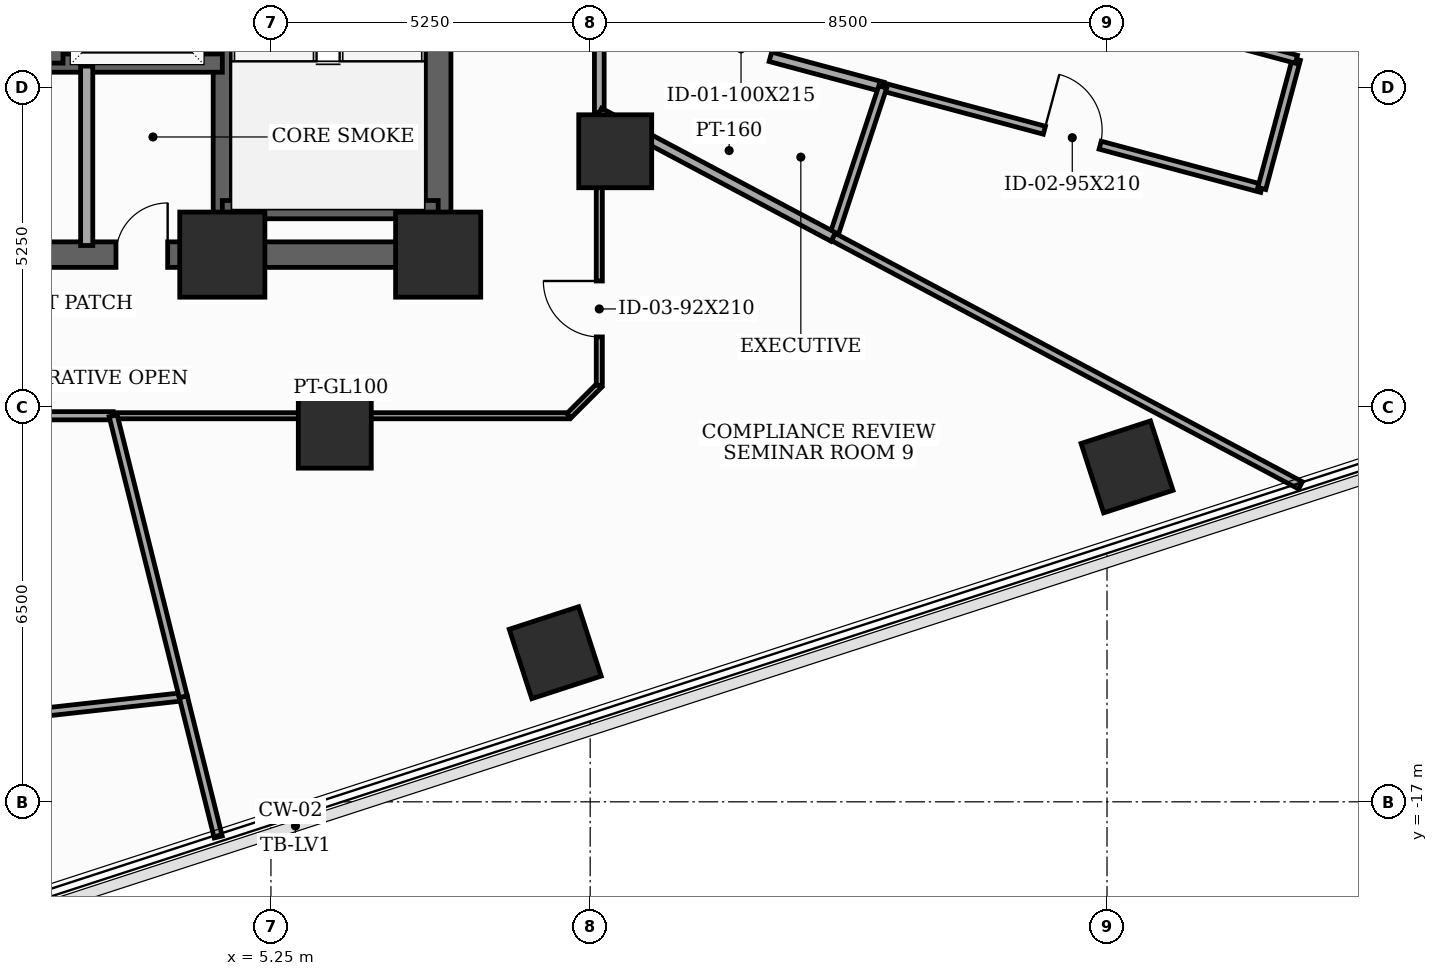
"""IFC4 building model, lengths in metres.
Left out: names, types, materials, properties, quantities, classifications, styles, units other than length and angle.
Written with IfcOpenShell. Run it as: python <this file> out.ifc"""

import sys

from ifc_helpers import new_model, si_unit, direction, frame, frame_2d, origin, origin_2d, place, context, subcontext, project, spatial, rectangle, extrude, element, fill, save


model = new_model("IFC4")
c1 = context("Model", 3, precision=1e-05, world=origin(), true_north=direction((0.0, 1.0)))
c2 = subcontext(c1, "Body", "Model", "MODEL_VIEW")
j1 = project(units=[si_unit("LENGTHUNIT", "METRE"), si_unit("PLANEANGLEUNIT", "RADIAN")], contexts=[c1])
p1 = place(None, origin())
s1 = spatial("IfcSite", under=j1, at=p1, CompositionType="ELEMENT")
p2 = place(p1, origin())
s2 = spatial("IfcBuilding", under=s1, at=p2, CompositionType="ELEMENT")
p3 = place(p2, frame((0.0, 0.0, 112.5)))
s3 = spatial("IfcBuildingStorey", under=s2, at=p3, CompositionType="ELEMENT", Elevation=112.5)
for number, where, z_axis, x_axis in (
    (1, (4.45, -8.0, 0.0), (0.0, 0.0, 1.0), (1.0, 0.0, 0.0)),
    (2, (8.0, -8.0, 0.0), (0.0, 0.0, 1.0), (1.0, 0.0, 0.0)),
):
    element("IfcColumn", number, at=place(p3, frame(where, z_axis=z_axis, x_axis=x_axis)), inside=s3, PredefinedType="COLUMN", context=c2, shape_type="SweptSolid", body=[
        extrude(rectangle(XDim=1.4, YDim=1.4, at=origin_2d()), origin(), (0.0, 0.0, 1.0), 3.7),
    ])
for number, where, z_axis, x_axis in (
    (3, (6.3, -10.912, 0.0), (0.0, 0.0, 1.0), (1.0, 0.0, 0.0)),
    (4, (10.912, -6.3, 0.0), (0.0, 0.0, 1.0), (1.0, 0.0, 0.0)),
    (5, (9.925, -14.547, 0.0), (0.0, 0.0, 1.0), (0.951, 0.309, 0.0)),
    (6, (19.329, -11.491, 0.0), (0.0, 0.0, 1.0), (0.951, 0.309, 0.0)),
):
    element("IfcColumn", number, at=place(p3, frame(where, z_axis=z_axis, x_axis=x_axis)), inside=s3, PredefinedType="COLUMN", context=c2, shape_type="SweptSolid", body=[
        extrude(rectangle(XDim=1.2, YDim=1.2, at=origin_2d()), origin(), (0.0, 0.0, 1.0), 3.7),
    ])
p4 = place(p3, frame((8.0, -8.0, 0.0), z_axis=(0.0, 0.0, 1.0), x_axis=(0.0, 1.0, 0.0)))
e7 = element("IfcWall", 7, at=p4, inside=s3, PredefinedType="SHEAR", context=c2, shape_type="SweptSolid", body=[
    extrude(rectangle(XDim=16.0, YDim=0.42, at=frame_2d((8.0, 0.0))), origin(), (0.0, 0.0, 1.0), 3.5),
])
p5 = place(p4, frame((9.6, 0.0, 0.0)))
e8 = element("IfcOpeningElement", 8, at=p5, cuts=e7, PredefinedType="OPENING", context=c2, shape_type="SweptSolid", body=[
    extrude(rectangle(XDim=1.05, YDim=2.15, at=frame_2d((0.525, 1.075))), frame((0.0, 0.22, 0.0), z_axis=(0.0, -1.0, 0.0), x_axis=(1.0, 0.0, 0.0)), (0.0, 0.0, 1.0), 0.44),
])
p6 = place(p4, frame((14.229, 0.0, 0.0)))
e9 = element("IfcOpeningElement", 9, at=p6, cuts=e7, PredefinedType="OPENING", context=c2, shape_type="SweptSolid", body=[
    extrude(rectangle(XDim=0.85, YDim=2.02, at=frame_2d((0.425, 1.01))), frame((0.0, 0.22, 0.0), z_axis=(0.0, -1.0, 0.0), x_axis=(1.0, 0.0, 0.0)), (0.0, 0.0, 1.0), 0.44),
])
p7 = place(p3, frame((-8.0, -8.0, 0.0), z_axis=(0.0, 0.0, 1.0), x_axis=(1.0, 0.0, 0.0)))
e10 = element("IfcWall", 10, at=p7, inside=s3, PredefinedType="SHEAR", context=c2, shape_type="SweptSolid", body=[
    extrude(rectangle(XDim=16.0, YDim=0.42, at=frame_2d((8.0, 0.0))), origin(), (0.0, 0.0, 1.0), 3.5),
])
p8 = place(p7, frame((4.449, 0.0, 0.0)))
e11 = element("IfcOpeningElement", 11, at=p8, cuts=e10, PredefinedType="OPENING", context=c2, shape_type="SweptSolid", body=[
    extrude(rectangle(XDim=0.85, YDim=2.02, at=frame_2d((0.425, 1.01))), frame((0.0, 0.22, 0.0), z_axis=(0.0, -1.0, 0.0), x_axis=(1.0, 0.0, 0.0)), (0.0, 0.0, 1.0), 0.44),
])
p9 = place(p7, frame((6.49, 0.0, 0.0)))
e12 = element("IfcOpeningElement", 12, at=p9, cuts=e10, PredefinedType="OPENING", context=c2, shape_type="SweptSolid", body=[
    extrude(rectangle(XDim=0.85, YDim=2.02, at=frame_2d((0.425, 1.01))), frame((0.0, 0.22, 0.0), z_axis=(0.0, -1.0, 0.0), x_axis=(1.0, 0.0, 0.0)), (0.0, 0.0, 1.0), 0.44),
])
p10 = place(p7, frame((8.69, 0.0, 0.0)))
e13 = element("IfcOpeningElement", 13, at=p10, cuts=e10, PredefinedType="OPENING", context=c2, shape_type="SweptSolid", body=[
    extrude(rectangle(XDim=0.85, YDim=2.02, at=frame_2d((0.425, 1.01))), frame((0.0, 0.22, 0.0), z_axis=(0.0, -1.0, 0.0), x_axis=(1.0, 0.0, 0.0)), (0.0, 0.0, 1.0), 0.44),
])
p11 = place(p7, frame((10.701, 0.0, 0.0)))
e14 = element("IfcOpeningElement", 14, at=p11, cuts=e10, PredefinedType="OPENING", context=c2, shape_type="SweptSolid", body=[
    extrude(rectangle(XDim=0.85, YDim=2.02, at=frame_2d((0.425, 1.01))), frame((0.0, 0.22, 0.0), z_axis=(0.0, -1.0, 0.0), x_axis=(1.0, 0.0, 0.0)), (0.0, 0.0, 1.0), 0.44),
])
p12 = place(p3, frame((4.45, -7.79, 0.0), z_axis=(0.0, 0.0, 1.0), x_axis=(0.0, 1.0, 0.0)))
e15 = element("IfcWall", 15, at=p12, inside=s3, PredefinedType="SHEAR", context=c2, shape_type="SweptSolid", body=[
    extrude(rectangle(XDim=15.58, YDim=0.3, at=frame_2d((7.79, 0.0))), origin(), (0.0, 0.0, 1.0), 3.5),
])
p13 = place(p3, frame((4.45, -7.26, 0.0), z_axis=(0.0, 0.0, 1.0), x_axis=(1.0, 0.0, 0.0)))
e16 = element("IfcWall", 16, at=p13, inside=s3, PredefinedType="SHEAR", context=c2, shape_type="SweptSolid", body=[
    extrude(rectangle(XDim=3.55, YDim=0.3, at=frame_2d((1.775, 0.0))), origin(), (0.0, 0.0, 1.0), 3.5),
])
p14 = place(p3, frame((-4.45, -4.85, 0.0), z_axis=(0.0, 0.0, 1.0), x_axis=(1.0, 0.0, 0.0)))
e17 = element("IfcWall", 17, at=p14, inside=s3, PredefinedType="SHEAR", context=c2, shape_type="SweptSolid", body=[
    extrude(rectangle(XDim=8.9, YDim=0.3, at=frame_2d((4.45, 0.0))), origin(), (0.0, 0.0, 1.0), 3.5),
])
p15 = place(p3, frame((1.68, -4.85, 0.0), z_axis=(0.0, 0.0, 1.0), x_axis=(0.0, 1.0, 0.0)))
e18 = element("IfcWall", 18, at=p15, inside=s3, PredefinedType="SHEAR", context=c2, shape_type="SweptSolid", body=[
    extrude(rectangle(XDim=12.64, YDim=0.3, at=frame_2d((6.32, 0.0))), origin(), (0.0, 0.0, 1.0), 3.5),
])
p16 = place(p15, frame((0.55, 0.0, 0.0)))
e19 = element("IfcOpeningElement", 19, at=p16, cuts=e18, PredefinedType="OPENING", context=c2, shape_type="SweptSolid", body=[
    extrude(rectangle(XDim=1.1, YDim=2.1, at=frame_2d((0.55, 1.05))), frame((0.0, 0.16, 0.0), z_axis=(0.0, -1.0, 0.0), x_axis=(1.0, 0.0, 0.0)), (0.0, 0.0, 1.0), 0.32),
])
p17 = place(p15, frame((2.65, 0.0, 0.0)))
e20 = element("IfcOpeningElement", 20, at=p17, cuts=e18, PredefinedType="OPENING", context=c2, shape_type="SweptSolid", body=[
    extrude(rectangle(XDim=1.1, YDim=2.1, at=frame_2d((0.55, 1.05))), frame((0.0, 0.16, 0.0), z_axis=(0.0, -1.0, 0.0), x_axis=(1.0, 0.0, 0.0)), (0.0, 0.0, 1.0), 0.32),
])
p18 = place(p15, frame((4.75, 0.0, 0.0)))
e21 = element("IfcOpeningElement", 21, at=p18, cuts=e18, PredefinedType="OPENING", context=c2, shape_type="SweptSolid", body=[
    extrude(rectangle(XDim=1.1, YDim=2.1, at=frame_2d((0.55, 1.05))), frame((0.0, 0.16, 0.0), z_axis=(0.0, -1.0, 0.0), x_axis=(1.0, 0.0, 0.0)), (0.0, 0.0, 1.0), 0.32),
])
p19 = place(p15, frame((6.85, 0.0, 0.0)))
e22 = element("IfcOpeningElement", 22, at=p19, cuts=e18, PredefinedType="OPENING", context=c2, shape_type="SweptSolid", body=[
    extrude(rectangle(XDim=1.1, YDim=2.1, at=frame_2d((0.55, 1.05))), frame((0.0, 0.16, 0.0), z_axis=(0.0, -1.0, 0.0), x_axis=(1.0, 0.0, 0.0)), (0.0, 0.0, 1.0), 0.32),
])
p20 = place(p15, frame((8.95, 0.0, 0.0)))
e23 = element("IfcOpeningElement", 23, at=p20, cuts=e18, PredefinedType="OPENING", context=c2, shape_type="SweptSolid", body=[
    extrude(rectangle(XDim=1.1, YDim=2.1, at=frame_2d((0.55, 1.05))), frame((0.0, 0.16, 0.0), z_axis=(0.0, -1.0, 0.0), x_axis=(1.0, 0.0, 0.0)), (0.0, 0.0, 1.0), 0.32),
])
p21 = place(p15, frame((11.05, 0.0, 0.0)))
e24 = element("IfcOpeningElement", 24, at=p21, cuts=e18, PredefinedType="OPENING", context=c2, shape_type="SweptSolid", body=[
    extrude(rectangle(XDim=1.1, YDim=2.1, at=frame_2d((0.55, 1.05))), frame((0.0, 0.16, 0.0), z_axis=(0.0, -1.0, 0.0), x_axis=(1.0, 0.0, 0.0)), (0.0, 0.0, 1.0), 0.32),
])
p22 = place(p3, frame((2.22, -7.85, 0.0), z_axis=(0.0, 0.0, 1.0), x_axis=(0.0, 1.0, 0.0)))
e25 = element("IfcWall", 25, at=p22, inside=s3, PredefinedType="SOLIDWALL", context=c2, shape_type="SweptSolid", body=[
    extrude(rectangle(XDim=2.95, YDim=0.2, at=frame_2d((1.475, 0.0))), origin(), (0.0, 0.0, 1.0), 2.885),
])
p23 = place(p3, frame((15.312, -5.242, 0.0), z_axis=(0.0, 0.0, 1.0), x_axis=(0.965923394249, -0.258828121428, 0.0)))
e26 = element("IfcWall", 26, at=p23, inside=s3, PredefinedType="PARTITIONING", context=c2, shape_type="SweptSolid", body=[
    extrude(rectangle(XDim=6.453, YDim=0.135, at=frame_2d((3.227, 0.0))), origin(), (0.0, 0.0, 1.0), 2.935),
])
p24 = place(p23, frame((2.751, 0.0, 0.0)))
e27 = element("IfcOpeningElement", 27, at=p24, cuts=e26, PredefinedType="OPENING", context=c2, shape_type="SweptSolid", body=[
    extrude(rectangle(XDim=0.95, YDim=2.1, at=frame_2d((0.475, 1.05))), frame((0.0, 0.077, 0.0), z_axis=(0.0, -1.0, 0.0), x_axis=(1.0, 0.0, 0.0)), (0.0, 0.0, 1.0), 0.155),
])
p25 = place(p3, frame((21.545, -6.912, 0.0), z_axis=(0.0, 0.0, 1.0), x_axis=(0.259105843213, 0.965848933329, 0.0)))
e28 = element("IfcWall", 28, at=p25, inside=s3, PredefinedType="PARTITIONING", context=c2, shape_type="SweptSolid", body=[
    extrude(rectangle(XDim=2.2, YDim=0.135, at=frame_2d((1.1, 0.0))), origin(), (0.0, 0.0, 1.0), 3.5),
])
p26 = place(p3, frame((22.115, -4.787, 0.0), z_axis=(0.0, 0.0, 1.0), x_axis=(-0.965917916001, 0.258848564894, 0.0)))
e29 = element("IfcWall", 29, at=p26, inside=s3, PredefinedType="PARTITIONING", context=c2, shape_type="SweptSolid", body=[
    extrude(rectangle(XDim=6.329, YDim=0.135, at=frame_2d((3.164, 0.0))), origin(), (0.0, 0.0, 1.0), 2.935),
])
p27 = place(p3, frame((10.65, -5.663, 0.0), z_axis=(0.0, 0.0, 1.0), x_axis=(0.0, 1.0, 0.0)))
e30 = element("IfcWall", 30, at=p27, inside=s3, PredefinedType="PARTITIONING", context=c2, shape_type="SweptSolid", body=[
    extrude(rectangle(XDim=1.671, YDim=0.16, at=frame_2d((0.835, 0.0))), origin(), (0.0, 0.0, 1.0), 3.5),
])
p28 = place(p3, frame((10.65, -3.992, 0.0), z_axis=(0.0, 0.0, 1.0), x_axis=(0.965884815894, -0.258972049507, 0.0)))
e31 = element("IfcWall", 31, at=p28, inside=s3, PredefinedType="PARTITIONING", context=c2, shape_type="SweptSolid", body=[
    extrude(rectangle(XDim=4.827, YDim=0.16, at=frame_2d((2.413, 0.0))), origin(), (0.0, 0.0, 1.0), 2.785),
])
p29 = place(p28, frame((1.913, 0.0, 0.0)))
e32 = element("IfcOpeningElement", 32, at=p29, cuts=e31, PredefinedType="OPENING", context=c2, shape_type="SweptSolid", body=[
    extrude(rectangle(XDim=1.0, YDim=2.15, at=frame_2d((0.5, 1.075))), frame((0.0, 0.09, 0.0), z_axis=(0.0, -1.0, 0.0), x_axis=(1.0, 0.0, 0.0)), (0.0, 0.0, 1.0), 0.18),
])
p30 = place(p3, frame((-1.715, -10.65, 0.0), z_axis=(0.0, 0.0, 1.0), x_axis=(1.0, 0.0, 0.0)))
e33 = element("IfcWall", 33, at=p30, inside=s3, PredefinedType="PARTITIONING", context=c2, shape_type="SweptSolid", body=[
    extrude(rectangle(XDim=4.37, YDim=0.135, at=frame_2d((2.185, 0.0))), origin(), (0.0, 0.0, 1.0), 2.785),
])
p31 = place(p3, frame((2.655, -10.65, 0.0), z_axis=(0.0, 0.0, 1.0), x_axis=(1.0, 0.0, 0.0)))
e34 = element("IfcWall", 34, at=p31, inside=s3, PredefinedType="MOVABLE", context=c2, shape_type="SweptSolid", body=[
    extrude(rectangle(XDim=7.495, YDim=0.1, at=frame_2d((3.748, 0.0))), origin(), (0.0, 0.0, 1.0), 2.785),
])
p32 = place(p3, frame((10.15, -10.65, 0.0), z_axis=(0.0, 0.0, 1.0), x_axis=(0.707106781187, 0.707106781187, 0.0)))
e35 = element("IfcWall", 35, at=p32, inside=s3, PredefinedType="MOVABLE", context=c2, shape_type="SweptSolid", body=[
    extrude(rectangle(XDim=0.707, YDim=0.1, at=frame_2d((0.354, 0.0))), origin(), (0.0, 0.0, 1.0), 3.5),
])
p33 = place(p3, frame((10.65, -10.15, 0.0), z_axis=(0.0, 0.0, 1.0), x_axis=(0.0, 1.0, 0.0)))
e36 = element("IfcWall", 36, at=p33, inside=s3, PredefinedType="MOVABLE", context=c2, shape_type="SweptSolid", body=[
    extrude(rectangle(XDim=4.487, YDim=0.1, at=frame_2d((2.243, 0.0))), origin(), (0.0, 0.0, 1.0), 2.785),
])
p34 = place(p33, frame((0.796, 0.0, 0.0)))
e37 = element("IfcOpeningElement", 37, at=p34, cuts=e36, PredefinedType="OPENING", context=c2, shape_type="SweptSolid", body=[
    extrude(rectangle(XDim=0.92, YDim=2.1, at=frame_2d((0.46, 1.05))), frame((0.0, 0.06, 0.0), z_axis=(0.0, -1.0, 0.0), x_axis=(1.0, 0.0, 0.0)), (0.0, 0.0, 1.0), 0.12),
])
p35 = place(p3, frame((15.312, -5.242, 0.0), z_axis=(0.0, 0.0, 1.0), x_axis=(-0.313322366974, -0.949646826117, 0.0)))
e38 = element("IfcWall", 38, at=p35, inside=s3, PredefinedType="PARTITIONING", context=c2, shape_type="SweptSolid", body=[
    extrude(rectangle(XDim=2.598, YDim=0.135, at=frame_2d((1.299, 0.0))), origin(), (0.0, 0.0, 1.0), 3.5),
])
p36 = place(p3, frame((14.498, -7.709, 0.0), z_axis=(0.0, 0.0, 1.0), x_axis=(0.882923859613, -0.469516195808, 0.0)))
e39 = element("IfcWall", 39, at=p36, inside=s3, PredefinedType="PARTITIONING", context=c2, shape_type="SweptSolid", body=[
    extrude(rectangle(XDim=8.702, YDim=0.135, at=frame_2d((4.351, 0.0))), origin(), (0.0, 0.0, 1.0), 2.935),
])
p37 = place(p3, frame((3.808, -15.271, 0.0), z_axis=(0.0, 0.0, 1.0), x_axis=(-0.993881155161, -0.110454739221, 0.0)))
e40 = element("IfcWall", 40, at=p37, inside=s3, PredefinedType="PARTITIONING", context=c2, shape_type="SweptSolid", body=[
    extrude(rectangle(XDim=4.617, YDim=0.135, at=frame_2d((2.309, 0.0))), origin(), (0.0, 0.0, 1.0), 2.785),
])
p38 = place(p3, frame((4.383, -17.578, 0.0), z_axis=(0.0, 0.0, 1.0), x_axis=(-0.241714079876, 0.970347516918, 0.0)))
e41 = element("IfcWall", 41, at=p38, inside=s3, PredefinedType="PARTITIONING", context=c2, shape_type="SweptSolid", body=[
    extrude(rectangle(XDim=2.378, YDim=0.135, at=frame_2d((1.189, 0.0))), origin(), (0.0, 0.0, 1.0), 2.935),
])
p39 = place(p3, frame((10.65, -5.663, 0.0), z_axis=(0.0, 0.0, 1.0), x_axis=(0.882966263113, -0.469436447461, 0.0)))
e42 = element("IfcWall", 42, at=p39, inside=s3, PredefinedType="PARTITIONING", context=c2, shape_type="SweptSolid", body=[
    extrude(rectangle(XDim=4.358, YDim=0.16, at=frame_2d((2.179, 0.0))), origin(), (0.0, 0.0, 1.0), 2.785),
])
p40 = place(p3, frame((3.808, -15.271, 0.0), z_axis=(0.0, 0.0, 1.0), x_axis=(-0.242101397643, 0.970250953753, 0.0)))
e43 = element("IfcWall", 43, at=p40, inside=s3, PredefinedType="PARTITIONING", context=c2, shape_type="SweptSolid", body=[
    extrude(rectangle(XDim=4.763, YDim=0.135, at=frame_2d((2.381, 0.0))), origin(), (0.0, 0.0, 1.0), 2.785),
])
p41 = place(p11, origin())
e44 = element("IfcDoor", 44, at=p41, inside=s3, OperationType="SINGLE_SWING_RIGHT", PredefinedType="TRAPDOOR", context=c2, shape_type="SweptSolid", body=[
    extrude(rectangle(XDim=0.85, YDim=2.02, at=frame_2d((0.425, 1.01))), frame((0.0, 0.025, 0.0), z_axis=(0.0, -1.0, 0.0), x_axis=(1.0, 0.0, 0.0)), (0.0, 0.0, 1.0), 0.05),
])
fill(e14, e44)
p42 = place(p24, origin())
e45 = element("IfcDoor", 45, at=p42, inside=s3, OperationType="SINGLE_SWING_LEFT", PredefinedType="DOOR", context=c2, shape_type="SweptSolid", body=[
    extrude(rectangle(XDim=0.95, YDim=2.1, at=frame_2d((0.475, 1.05))), frame((0.0, 0.025, 0.0), z_axis=(0.0, -1.0, 0.0), x_axis=(1.0, 0.0, 0.0)), (0.0, 0.0, 1.0), 0.05),
])
fill(e27, e45)
p43 = place(p29, origin())
e46 = element("IfcDoor", 46, at=p43, inside=s3, OperationType="SINGLE_SWING_LEFT", PredefinedType="DOOR", context=c2, shape_type="SweptSolid", body=[
    extrude(rectangle(XDim=1.0, YDim=2.15, at=frame_2d((0.5, 1.075))), frame((0.0, 0.025, 0.0), z_axis=(0.0, -1.0, 0.0), x_axis=(1.0, 0.0, 0.0)), (0.0, 0.0, 1.0), 0.05),
])
fill(e32, e46)
p44 = place(p34, origin())
e47 = element("IfcDoor", 47, at=p44, inside=s3, OperationType="SINGLE_SWING_RIGHT", PredefinedType="DOOR", context=c2, shape_type="SweptSolid", body=[
    extrude(rectangle(XDim=0.92, YDim=2.1, at=frame_2d((0.46, 1.05))), frame((0.0, 0.025, 0.0), z_axis=(0.0, -1.0, 0.0), x_axis=(1.0, 0.0, 0.0)), (0.0, 0.0, 1.0), 0.05),
])
fill(e37, e47)
save(model, sys.argv[1])
